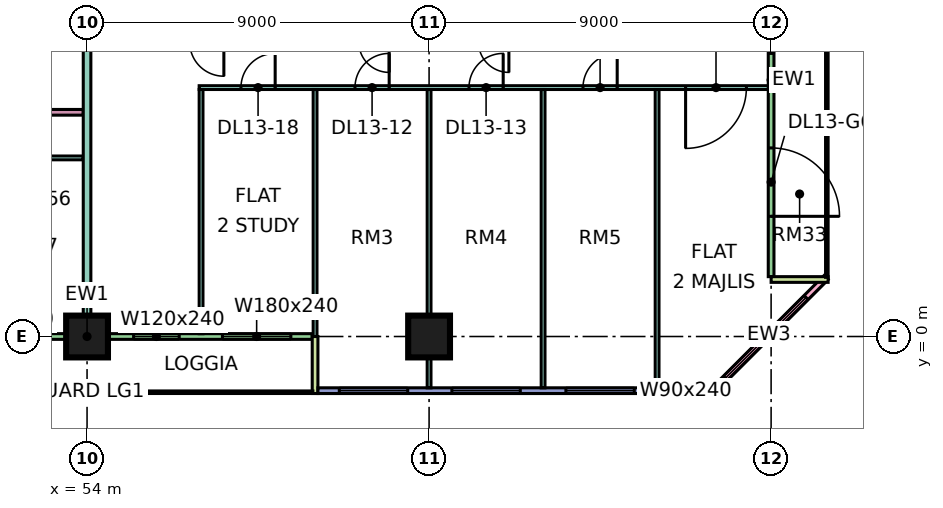
"""IFC4 building model, lengths in metres.
Left out: names, types, materials, properties, quantities, classifications, styles, units other than length and angle.
Written with IfcOpenShell. Run it as: python <this file> out.ifc"""

import sys

from ifc_helpers import new_model, si_unit, direction, frame, frame_2d, origin, origin_2d, place, context, subcontext, project, spatial, rectangle, extrude, element, fill, save


model = new_model("IFC4")
c1 = context("Model", 3, precision=1e-05, world=origin(), true_north=direction((0.0, 1.0)))
c2 = subcontext(c1, "Body", "Model", "MODEL_VIEW")
j1 = project(units=[si_unit("LENGTHUNIT", "METRE"), si_unit("PLANEANGLEUNIT", "RADIAN")], contexts=[c1])
p1 = place(None, origin())
s1 = spatial("IfcSite", under=j1, at=p1, CompositionType="ELEMENT")
p2 = place(p1, origin())
s2 = spatial("IfcBuilding", under=s1, at=p2, CompositionType="ELEMENT")
p3 = place(p2, frame((0.0, 0.0, 63.9)))
s3 = spatial("IfcBuildingStorey", under=s2, at=p3, CompositionType="ELEMENT", Elevation=63.9)
for number, where, z_axis, x_axis in (
    (1, (54.0, 0.0, 0.0), (0.0, 0.0, 1.0), (1.0, 0.0, 0.0)),
    (2, (63.0, 0.0, 0.0), (0.0, 0.0, 1.0), (1.0, 0.0, 0.0)),
):
    element("IfcColumn", number, at=place(p3, frame(where, z_axis=z_axis, x_axis=x_axis)), inside=s3, PredefinedType="COLUMN", context=c2, shape_type="SweptSolid", body=[
        extrude(rectangle(XDim=1.1, YDim=1.1, at=origin_2d()), origin(), (0.0, 0.0, 1.0), 3.75),
    ])
p4 = place(p3, frame((48.075, 0.0, 0.0), z_axis=(0.0, 0.0, 1.0), x_axis=(1.0, 0.0, 0.0)))
e3 = element("IfcWall", 3, at=p4, inside=s3, PredefinedType="SOLIDWALL", context=c2, shape_type="SweptSolid", body=[
    extrude(rectangle(XDim=11.85, YDim=0.15, at=frame_2d((5.925, 0.0))), origin(), (0.0, 0.0, 1.0), 3.35),
])
p5 = place(p4, frame((0.562, 0.0, 0.45)))
e4 = element("IfcOpeningElement", 4, at=p5, cuts=e3, PredefinedType="OPENING", context=c2, shape_type="SweptSolid", body=[
    extrude(rectangle(XDim=1.8, YDim=2.4, at=frame_2d((0.9, 1.2))), frame((0.0, 0.085, 0.0), z_axis=(0.0, -1.0, 0.0), x_axis=(1.0, 0.0, 0.0)), (0.0, 0.0, 1.0), 0.17),
])
p6 = place(p4, frame((3.5, 0.0, 0.45)))
e5 = element("IfcOpeningElement", 5, at=p6, cuts=e3, PredefinedType="OPENING", context=c2, shape_type="SweptSolid", body=[
    extrude(rectangle(XDim=1.2, YDim=2.4, at=frame_2d((0.6, 1.2))), frame((0.0, 0.085, 0.0), z_axis=(0.0, -1.0, 0.0), x_axis=(1.0, 0.0, 0.0)), (0.0, 0.0, 1.0), 0.17),
])
p7 = place(p4, frame((7.15, 0.0, 0.45)))
e6 = element("IfcOpeningElement", 6, at=p7, cuts=e3, PredefinedType="OPENING", context=c2, shape_type="SweptSolid", body=[
    extrude(rectangle(XDim=1.2, YDim=2.4, at=frame_2d((0.6, 1.2))), frame((0.0, 0.085, 0.0), z_axis=(0.0, -1.0, 0.0), x_axis=(1.0, 0.0, 0.0)), (0.0, 0.0, 1.0), 0.17),
])
p8 = place(p4, frame((9.488, 0.0, 0.45)))
e7 = element("IfcOpeningElement", 7, at=p8, cuts=e3, PredefinedType="OPENING", context=c2, shape_type="SweptSolid", body=[
    extrude(rectangle(XDim=1.8, YDim=2.4, at=frame_2d((0.9, 1.2))), frame((0.0, 0.085, 0.0), z_axis=(0.0, -1.0, 0.0), x_axis=(1.0, 0.0, 0.0)), (0.0, 0.0, 1.0), 0.17),
])
p9 = place(p3, frame((60.0, -1.5, 0.0), z_axis=(0.0, 0.0, 1.0), x_axis=(0.0, 1.0, 0.0)))
e8 = element("IfcWall", 8, at=p9, inside=s3, PredefinedType="SOLIDWALL", context=c2, shape_type="SweptSolid", body=[
    extrude(rectangle(XDim=1.5, YDim=0.15, at=frame_2d((0.75, 0.0))), origin(), (0.0, 0.0, 1.0), 3.35),
])
p10 = place(p3, frame((60.075, -1.425, 0.0), z_axis=(0.0, 0.0, 1.0), x_axis=(1.0, 0.0, 0.0)))
e9 = element("IfcWall", 9, at=p10, inside=s3, PredefinedType="SOLIDWALL", context=c2, shape_type="SweptSolid", body=[
    extrude(rectangle(XDim=10.425, YDim=0.15, at=frame_2d((5.212, 0.0))), origin(), (0.0, 0.0, 1.0), 3.35),
])
p11 = place(p10, frame((0.562, 0.0, 0.45)))
e10 = element("IfcOpeningElement", 10, at=p11, cuts=e9, PredefinedType="OPENING", context=c2, shape_type="SweptSolid", body=[
    extrude(rectangle(XDim=1.8, YDim=2.4, at=frame_2d((0.9, 1.2))), frame((0.0, 0.085, 0.0), z_axis=(0.0, -1.0, 0.0), x_axis=(1.0, 0.0, 0.0)), (0.0, 0.0, 1.0), 0.17),
])
p12 = place(p10, frame((3.525, 0.0, 0.45)))
e11 = element("IfcOpeningElement", 11, at=p12, cuts=e9, PredefinedType="OPENING", context=c2, shape_type="SweptSolid", body=[
    extrude(rectangle(XDim=1.8, YDim=2.4, at=frame_2d((0.9, 1.2))), frame((0.0, 0.085, 0.0), z_axis=(0.0, -1.0, 0.0), x_axis=(1.0, 0.0, 0.0)), (0.0, 0.0, 1.0), 0.17),
])
p13 = place(p10, frame((6.525, 0.0, 0.45)))
e12 = element("IfcOpeningElement", 12, at=p13, cuts=e9, PredefinedType="OPENING", context=c2, shape_type="SweptSolid", body=[
    extrude(rectangle(XDim=1.8, YDim=2.4, at=frame_2d((0.9, 1.2))), frame((0.0, 0.085, 0.0), z_axis=(0.0, -1.0, 0.0), x_axis=(1.0, 0.0, 0.0)), (0.0, 0.0, 1.0), 0.17),
])
p14 = place(p10, frame((9.225, 0.0, 0.45)))
e13 = element("IfcOpeningElement", 13, at=p14, cuts=e9, PredefinedType="OPENING", context=c2, shape_type="SweptSolid", body=[
    extrude(rectangle(XDim=0.9, YDim=2.4, at=frame_2d((0.45, 1.2))), frame((0.0, 0.085, 0.0), z_axis=(0.0, -1.0, 0.0), x_axis=(1.0, 0.0, 0.0)), (0.0, 0.0, 1.0), 0.17),
])
p15 = place(p3, frame((70.447, -1.447, 0.0), z_axis=(0.0, 0.0, 1.0), x_axis=(0.707106781187, 0.707106781187, 0.0)))
e14 = element("IfcWall", 14, at=p15, inside=s3, PredefinedType="SOLIDWALL", context=c2, shape_type="SweptSolid", body=[
    extrude(rectangle(XDim=4.243, YDim=0.15, at=frame_2d((2.121, 0.0))), origin(), (0.0, 0.0, 1.0), 3.35),
])
p16 = place(p15, frame((0.498, 0.0, 0.45)))
e15 = element("IfcOpeningElement", 15, at=p16, cuts=e14, PredefinedType="OPENING", context=c2, shape_type="SweptSolid", body=[
    extrude(rectangle(XDim=3.0, YDim=2.4, at=frame_2d((1.5, 1.2))), frame((0.0, 0.085, 0.0), z_axis=(0.0, -1.0, 0.0), x_axis=(1.0, 0.0, 0.0)), (0.0, 0.0, 1.0), 0.17),
])
p17 = place(p3, frame((72.0, 1.575, 0.0), z_axis=(0.0, 0.0, 1.0), x_axis=(0.0, 1.0, 0.0)))
e16 = element("IfcWall", 16, at=p17, inside=s3, PredefinedType="SOLIDWALL", context=c2, shape_type="SweptSolid", body=[
    extrude(rectangle(XDim=10.35, YDim=0.15, at=frame_2d((5.175, 0.0))), origin(), (0.0, 0.0, 1.0), 3.35),
])
p18 = place(p17, frame((1.587, 0.0, 0.0)))
e17 = element("IfcOpeningElement", 17, at=p18, cuts=e16, PredefinedType="OPENING", context=c2, shape_type="SweptSolid", body=[
    extrude(rectangle(XDim=1.8, YDim=2.4, at=frame_2d((0.9, 1.2))), frame((0.0, 0.085, 0.0), z_axis=(0.0, -1.0, 0.0), x_axis=(1.0, 0.0, 0.0)), (0.0, 0.0, 1.0), 0.17),
])
p19 = place(p17, frame((5.875, 0.0, 0.45)))
e18 = element("IfcOpeningElement", 18, at=p19, cuts=e16, PredefinedType="OPENING", context=c2, shape_type="SweptSolid", body=[
    extrude(rectangle(XDim=3.0, YDim=2.4, at=frame_2d((1.5, 1.2))), frame((0.0, 0.085, 0.0), z_axis=(0.0, -1.0, 0.0), x_axis=(1.0, 0.0, 0.0)), (0.0, 0.0, 1.0), 0.17),
])
p20 = place(p3, frame((73.5, 1.5, 0.0), z_axis=(0.0, 0.0, 1.0), x_axis=(-1.0, 0.0, 0.0)))
e19 = element("IfcWall", 19, at=p20, inside=s3, PredefinedType="SOLIDWALL", context=c2, shape_type="SweptSolid", body=[
    extrude(rectangle(XDim=1.5, YDim=0.15, at=frame_2d((0.75, 0.0))), origin(), (0.0, 0.0, 1.0), 3.35),
])
p21 = place(p3, frame((33.05, 4.7, 0.0), z_axis=(0.0, 0.0, 1.0), x_axis=(1.0, 0.0, 0.0)))
e20 = element("IfcWall", 20, at=p21, inside=s3, PredefinedType="PARTITIONING", context=c2, shape_type="SweptSolid", body=[
    extrude(rectangle(XDim=20.85, YDim=0.1, at=frame_2d((10.425, 0.0))), origin(), (0.0, 0.0, 1.0), 3.35),
])
p22 = place(p21, frame((10.0, 0.0, 0.0)))
e21 = element("IfcOpeningElement", 21, at=p22, cuts=e20, PredefinedType="OPENING", context=c2, shape_type="SweptSolid", body=[
    extrude(rectangle(XDim=0.9, YDim=2.1, at=frame_2d((0.45, 1.05))), frame((0.0, 0.06, 0.0), z_axis=(0.0, -1.0, 0.0), x_axis=(1.0, 0.0, 0.0)), (0.0, 0.0, 1.0), 0.12),
])
p23 = place(p21, frame((13.0, 0.0, 0.0)))
e22 = element("IfcOpeningElement", 22, at=p23, cuts=e20, PredefinedType="OPENING", context=c2, shape_type="SweptSolid", body=[
    extrude(rectangle(XDim=0.9, YDim=2.1, at=frame_2d((0.45, 1.05))), frame((0.0, 0.06, 0.0), z_axis=(0.0, -1.0, 0.0), x_axis=(1.0, 0.0, 0.0)), (0.0, 0.0, 1.0), 0.12),
])
p24 = place(p21, frame((16.0, 0.0, 0.0)))
e23 = element("IfcOpeningElement", 23, at=p24, cuts=e20, PredefinedType="OPENING", context=c2, shape_type="SweptSolid", body=[
    extrude(rectangle(XDim=0.9, YDim=2.1, at=frame_2d((0.45, 1.05))), frame((0.0, 0.06, 0.0), z_axis=(0.0, -1.0, 0.0), x_axis=(1.0, 0.0, 0.0)), (0.0, 0.0, 1.0), 0.12),
])
p25 = place(p21, frame((19.0, 0.0, 0.0)))
e24 = element("IfcOpeningElement", 24, at=p25, cuts=e20, PredefinedType="OPENING", context=c2, shape_type="SweptSolid", body=[
    extrude(rectangle(XDim=0.9, YDim=2.1, at=frame_2d((0.45, 1.05))), frame((0.0, 0.06, 0.0), z_axis=(0.0, -1.0, 0.0), x_axis=(1.0, 0.0, 0.0)), (0.0, 0.0, 1.0), 0.12),
])
p26 = place(p21, frame((4.0, 0.0, 0.0)))
e25 = element("IfcOpeningElement", 25, at=p26, cuts=e20, PredefinedType="OPENING", context=c2, shape_type="SweptSolid", body=[
    extrude(rectangle(XDim=0.9, YDim=2.1, at=frame_2d((0.45, 1.05))), frame((0.0, 0.06, 0.0), z_axis=(0.0, -1.0, 0.0), x_axis=(1.0, 0.0, 0.0)), (0.0, 0.0, 1.0), 0.12),
])
p27 = place(p3, frame((43.575, 5.9, 0.0), z_axis=(0.0, 0.0, 1.0), x_axis=(1.0, 0.0, 0.0)))
e26 = element("IfcWall", 26, at=p27, inside=s3, PredefinedType="PARTITIONING", context=c2, shape_type="SweptSolid", body=[
    extrude(rectangle(XDim=10.325, YDim=0.15, at=frame_2d((5.163, 0.0))), origin(), (0.0, 0.0, 1.0), 3.35),
])
p28 = place(p27, frame((1.825, 0.0, 0.0)))
e27 = element("IfcOpeningElement", 27, at=p28, cuts=e26, PredefinedType="OPENING", context=c2, shape_type="SweptSolid", body=[
    extrude(rectangle(XDim=0.8, YDim=2.1, at=frame_2d((0.4, 1.05))), frame((0.0, 0.085, 0.0), z_axis=(0.0, -1.0, 0.0), x_axis=(1.0, 0.0, 0.0)), (0.0, 0.0, 1.0), 0.17),
])
p29 = place(p27, frame((6.975, 0.0, 0.0)))
e28 = element("IfcOpeningElement", 28, at=p29, cuts=e26, PredefinedType="OPENING", context=c2, shape_type="SweptSolid", body=[
    extrude(rectangle(XDim=0.9, YDim=2.1, at=frame_2d((0.45, 1.05))), frame((0.0, 0.085, 0.0), z_axis=(0.0, -1.0, 0.0), x_axis=(1.0, 0.0, 0.0)), (0.0, 0.0, 1.0), 0.17),
])
p30 = place(p3, frame((54.0, 0.074, 0.0), z_axis=(0.0, 0.0, 1.0), x_axis=(0.0, 1.0, 0.0)))
e29 = element("IfcWall", 29, at=p30, inside=s3, PredefinedType="PARTITIONING", context=c2, shape_type="SweptSolid", body=[
    extrude(rectangle(XDim=12.376, YDim=0.2, at=frame_2d((6.188, 0.0))), origin(), (0.0, 0.0, 1.0), 3.35),
])
p31 = place(p3, frame((56.95, 6.55, 0.0), z_axis=(0.0, 0.0, 1.0), x_axis=(1.0, 0.0, 0.0)))
e30 = element("IfcWall", 30, at=p31, inside=s3, PredefinedType="PARTITIONING", context=c2, shape_type="SweptSolid", body=[
    extrude(rectangle(XDim=14.976, YDim=0.1, at=frame_2d((7.488, 0.0))), origin(), (0.0, 0.0, 1.0), 3.35),
])
p32 = place(p31, frame((4.1, 0.0, 0.0)))
e31 = element("IfcOpeningElement", 31, at=p32, cuts=e30, PredefinedType="OPENING", context=c2, shape_type="SweptSolid", body=[
    extrude(rectangle(XDim=0.9, YDim=2.1, at=frame_2d((0.45, 1.05))), frame((0.0, 0.06, 0.0), z_axis=(0.0, -1.0, 0.0), x_axis=(1.0, 0.0, 0.0)), (0.0, 0.0, 1.0), 0.12),
])
p33 = place(p31, frame((7.1, 0.0, 0.0)))
e32 = element("IfcOpeningElement", 32, at=p33, cuts=e30, PredefinedType="OPENING", context=c2, shape_type="SweptSolid", body=[
    extrude(rectangle(XDim=0.9, YDim=2.1, at=frame_2d((0.45, 1.05))), frame((0.0, 0.06, 0.0), z_axis=(0.0, -1.0, 0.0), x_axis=(1.0, 0.0, 0.0)), (0.0, 0.0, 1.0), 0.12),
])
p34 = place(p31, frame((10.1, 0.0, 0.0)))
e33 = element("IfcOpeningElement", 33, at=p34, cuts=e30, PredefinedType="OPENING", context=c2, shape_type="SweptSolid", body=[
    extrude(rectangle(XDim=0.9, YDim=2.1, at=frame_2d((0.45, 1.05))), frame((0.0, 0.06, 0.0), z_axis=(0.0, -1.0, 0.0), x_axis=(1.0, 0.0, 0.0)), (0.0, 0.0, 1.0), 0.12),
])
p35 = place(p31, frame((12.8, 0.0, 0.0)))
e34 = element("IfcOpeningElement", 34, at=p35, cuts=e30, PredefinedType="OPENING", context=c2, shape_type="SweptSolid", body=[
    extrude(rectangle(XDim=1.6, YDim=2.1, at=frame_2d((0.8, 1.05))), frame((0.0, 0.06, 0.0), z_axis=(0.0, -1.0, 0.0), x_axis=(1.0, 0.0, 0.0)), (0.0, 0.0, 1.0), 0.12),
])
p36 = place(p31, frame((1.1, 0.0, 0.0)))
e35 = element("IfcOpeningElement", 35, at=p36, cuts=e30, PredefinedType="OPENING", context=c2, shape_type="SweptSolid", body=[
    extrude(rectangle(XDim=0.9, YDim=2.1, at=frame_2d((0.45, 1.05))), frame((0.0, 0.06, 0.0), z_axis=(0.0, -1.0, 0.0), x_axis=(1.0, 0.0, 0.0)), (0.0, 0.0, 1.0), 0.12),
])
p37 = place(p3, frame((57.0, 0.074, 0.0), z_axis=(0.0, 0.0, 1.0), x_axis=(0.0, 1.0, 0.0)))
e36 = element("IfcWall", 36, at=p37, inside=s3, PredefinedType="PARTITIONING", context=c2, shape_type="SweptSolid", body=[
    extrude(rectangle(XDim=6.426, YDim=0.1, at=frame_2d((3.213, 0.0))), origin(), (0.0, 0.0, 1.0), 3.35),
])
p38 = place(p3, frame((60.0, 0.0, 0.0), z_axis=(0.0, 0.0, 1.0), x_axis=(0.0, 1.0, 0.0)))
e37 = element("IfcWall", 37, at=p38, inside=s3, PredefinedType="PARTITIONING", context=c2, shape_type="SweptSolid", body=[
    extrude(rectangle(XDim=6.5, YDim=0.1, at=frame_2d((3.25, 0.0))), origin(), (0.0, 0.0, 1.0), 3.35),
])
for number, where, z_axis, x_axis in (
    (38, (63.0, -1.351, 0.0), (0.0, 0.0, 1.0), (0.0, 1.0, 0.0)),
    (39, (66.0, -1.351, 0.0), (0.0, 0.0, 1.0), (0.0, 1.0, 0.0)),
    (40, (69.0, -1.351, 0.0), (0.0, 0.0, 1.0), (0.0, 1.0, 0.0)),
):
    element("IfcWall", number, at=place(p3, frame(where, z_axis=z_axis, x_axis=x_axis)), inside=s3, PredefinedType="PARTITIONING", context=c2, shape_type="SweptSolid", body=[
        extrude(rectangle(XDim=7.851, YDim=0.1, at=frame_2d((3.926, 0.0))), origin(), (0.0, 0.0, 1.0), 3.35),
    ])
p39 = place(p7, origin())
e41 = element("IfcWindow", 41, at=p39, inside=s3, PartitioningType="SINGLE_PANEL", PredefinedType="WINDOW", context=c2, shape_type="SweptSolid", body=[
    extrude(rectangle(XDim=1.2, YDim=2.4, at=frame_2d((0.6, 1.2))), frame((0.0, 0.03, 0.0), z_axis=(0.0, -1.0, 0.0), x_axis=(1.0, 0.0, 0.0)), (0.0, 0.0, 1.0), 0.06),
])
fill(e6, e41)
p40 = place(p8, origin())
e42 = element("IfcWindow", 42, at=p40, inside=s3, PartitioningType="SINGLE_PANEL", PredefinedType="WINDOW", context=c2, shape_type="SweptSolid", body=[
    extrude(rectangle(XDim=1.8, YDim=2.4, at=frame_2d((0.9, 1.2))), frame((0.0, 0.03, 0.0), z_axis=(0.0, -1.0, 0.0), x_axis=(1.0, 0.0, 0.0)), (0.0, 0.0, 1.0), 0.06),
])
fill(e7, e42)
p41 = place(p11, origin())
e43 = element("IfcWindow", 43, at=p41, inside=s3, PartitioningType="SINGLE_PANEL", PredefinedType="WINDOW", context=c2, shape_type="SweptSolid", body=[
    extrude(rectangle(XDim=1.8, YDim=2.4, at=frame_2d((0.9, 1.2))), frame((0.0, 0.03, 0.0), z_axis=(0.0, -1.0, 0.0), x_axis=(1.0, 0.0, 0.0)), (0.0, 0.0, 1.0), 0.06),
])
fill(e10, e43)
p42 = place(p12, origin())
e44 = element("IfcWindow", 44, at=p42, inside=s3, PartitioningType="SINGLE_PANEL", PredefinedType="WINDOW", context=c2, shape_type="SweptSolid", body=[
    extrude(rectangle(XDim=1.8, YDim=2.4, at=frame_2d((0.9, 1.2))), frame((0.0, 0.03, 0.0), z_axis=(0.0, -1.0, 0.0), x_axis=(1.0, 0.0, 0.0)), (0.0, 0.0, 1.0), 0.06),
])
fill(e11, e44)
p43 = place(p13, origin())
e45 = element("IfcWindow", 45, at=p43, inside=s3, PartitioningType="SINGLE_PANEL", PredefinedType="WINDOW", context=c2, shape_type="SweptSolid", body=[
    extrude(rectangle(XDim=1.8, YDim=2.4, at=frame_2d((0.9, 1.2))), frame((0.0, 0.03, 0.0), z_axis=(0.0, -1.0, 0.0), x_axis=(1.0, 0.0, 0.0)), (0.0, 0.0, 1.0), 0.06),
])
fill(e12, e45)
p44 = place(p14, origin())
e46 = element("IfcWindow", 46, at=p44, inside=s3, PartitioningType="SINGLE_PANEL", PredefinedType="WINDOW", context=c2, shape_type="SweptSolid", body=[
    extrude(rectangle(XDim=0.9, YDim=2.4, at=frame_2d((0.45, 1.2))), frame((0.0, 0.03, 0.0), z_axis=(0.0, -1.0, 0.0), x_axis=(1.0, 0.0, 0.0)), (0.0, 0.0, 1.0), 0.06),
])
fill(e13, e46)
p45 = place(p16, origin())
e47 = element("IfcWindow", 47, at=p45, inside=s3, PartitioningType="SINGLE_PANEL", PredefinedType="WINDOW", context=c2, shape_type="SweptSolid", body=[
    extrude(rectangle(XDim=3.0, YDim=2.4, at=frame_2d((1.5, 1.2))), frame((0.0, 0.03, 0.0), z_axis=(0.0, -1.0, 0.0), x_axis=(1.0, 0.0, 0.0)), (0.0, 0.0, 1.0), 0.06),
])
fill(e15, e47)
p46 = place(p18, frame((1.8, 0.0, 0.0), z_axis=(0.0, 0.0, 1.0), x_axis=(-1.0, 0.0, 0.0)))
e48 = element("IfcDoor", 48, at=p46, inside=s3, OperationType="DOUBLE_DOOR_SINGLE_SWING", PredefinedType="DOOR", context=c2, shape_type="SweptSolid", body=[
    extrude(rectangle(XDim=1.8, YDim=2.4, at=frame_2d((0.9, 1.2))), frame((0.0, 0.025, 0.0), z_axis=(0.0, -1.0, 0.0), x_axis=(1.0, 0.0, 0.0)), (0.0, 0.0, 1.0), 0.05),
])
fill(e17, e48)
p47 = place(p19, origin())
e49 = element("IfcWindow", 49, at=p47, inside=s3, PartitioningType="SINGLE_PANEL", PredefinedType="WINDOW", context=c2, shape_type="SweptSolid", body=[
    extrude(rectangle(XDim=3.0, YDim=2.4, at=frame_2d((1.5, 1.2))), frame((0.0, 0.03, 0.0), z_axis=(0.0, -1.0, 0.0), x_axis=(1.0, 0.0, 0.0)), (0.0, 0.0, 1.0), 0.06),
])
fill(e18, e49)
p48 = place(p32, frame((0.9, 0.0, 0.0), z_axis=(0.0, 0.0, 1.0), x_axis=(-1.0, 0.0, 0.0)))
e50 = element("IfcDoor", 50, at=p48, inside=s3, OperationType="SINGLE_SWING_RIGHT", PredefinedType="DOOR", context=c2, shape_type="SweptSolid", body=[
    extrude(rectangle(XDim=0.9, YDim=2.1, at=frame_2d((0.45, 1.05))), frame((0.0, 0.025, 0.0), z_axis=(0.0, -1.0, 0.0), x_axis=(1.0, 0.0, 0.0)), (0.0, 0.0, 1.0), 0.05),
])
fill(e31, e50)
p49 = place(p33, frame((0.9, 0.0, 0.0), z_axis=(0.0, 0.0, 1.0), x_axis=(-1.0, 0.0, 0.0)))
e51 = element("IfcDoor", 51, at=p49, inside=s3, OperationType="SINGLE_SWING_RIGHT", PredefinedType="DOOR", context=c2, shape_type="SweptSolid", body=[
    extrude(rectangle(XDim=0.9, YDim=2.1, at=frame_2d((0.45, 1.05))), frame((0.0, 0.025, 0.0), z_axis=(0.0, -1.0, 0.0), x_axis=(1.0, 0.0, 0.0)), (0.0, 0.0, 1.0), 0.05),
])
fill(e32, e51)
p50 = place(p34, frame((0.9, 0.0, 0.0), z_axis=(0.0, 0.0, 1.0), x_axis=(-1.0, 0.0, 0.0)))
e52 = element("IfcDoor", 52, at=p50, inside=s3, OperationType="SINGLE_SWING_RIGHT", PredefinedType="DOOR", context=c2, shape_type="SweptSolid", body=[
    extrude(rectangle(XDim=0.9, YDim=2.1, at=frame_2d((0.45, 1.05))), frame((0.0, 0.025, 0.0), z_axis=(0.0, -1.0, 0.0), x_axis=(1.0, 0.0, 0.0)), (0.0, 0.0, 1.0), 0.05),
])
fill(e33, e52)
p51 = place(p35, frame((1.6, 0.0, 0.0), z_axis=(0.0, 0.0, 1.0), x_axis=(-1.0, 0.0, 0.0)))
e53 = element("IfcDoor", 53, at=p51, inside=s3, OperationType="DOUBLE_DOOR_SINGLE_SWING", PredefinedType="DOOR", context=c2, shape_type="SweptSolid", body=[
    extrude(rectangle(XDim=1.6, YDim=2.1, at=frame_2d((0.8, 1.05))), frame((0.0, 0.025, 0.0), z_axis=(0.0, -1.0, 0.0), x_axis=(1.0, 0.0, 0.0)), (0.0, 0.0, 1.0), 0.05),
])
fill(e34, e53)
p52 = place(p36, frame((0.9, 0.0, 0.0), z_axis=(0.0, 0.0, 1.0), x_axis=(-1.0, 0.0, 0.0)))
e54 = element("IfcDoor", 54, at=p52, inside=s3, OperationType="SINGLE_SWING_RIGHT", PredefinedType="DOOR", context=c2, shape_type="SweptSolid", body=[
    extrude(rectangle(XDim=0.9, YDim=2.1, at=frame_2d((0.45, 1.05))), frame((0.0, 0.025, 0.0), z_axis=(0.0, -1.0, 0.0), x_axis=(1.0, 0.0, 0.0)), (0.0, 0.0, 1.0), 0.05),
])
fill(e35, e54)
save(model, sys.argv[1])
